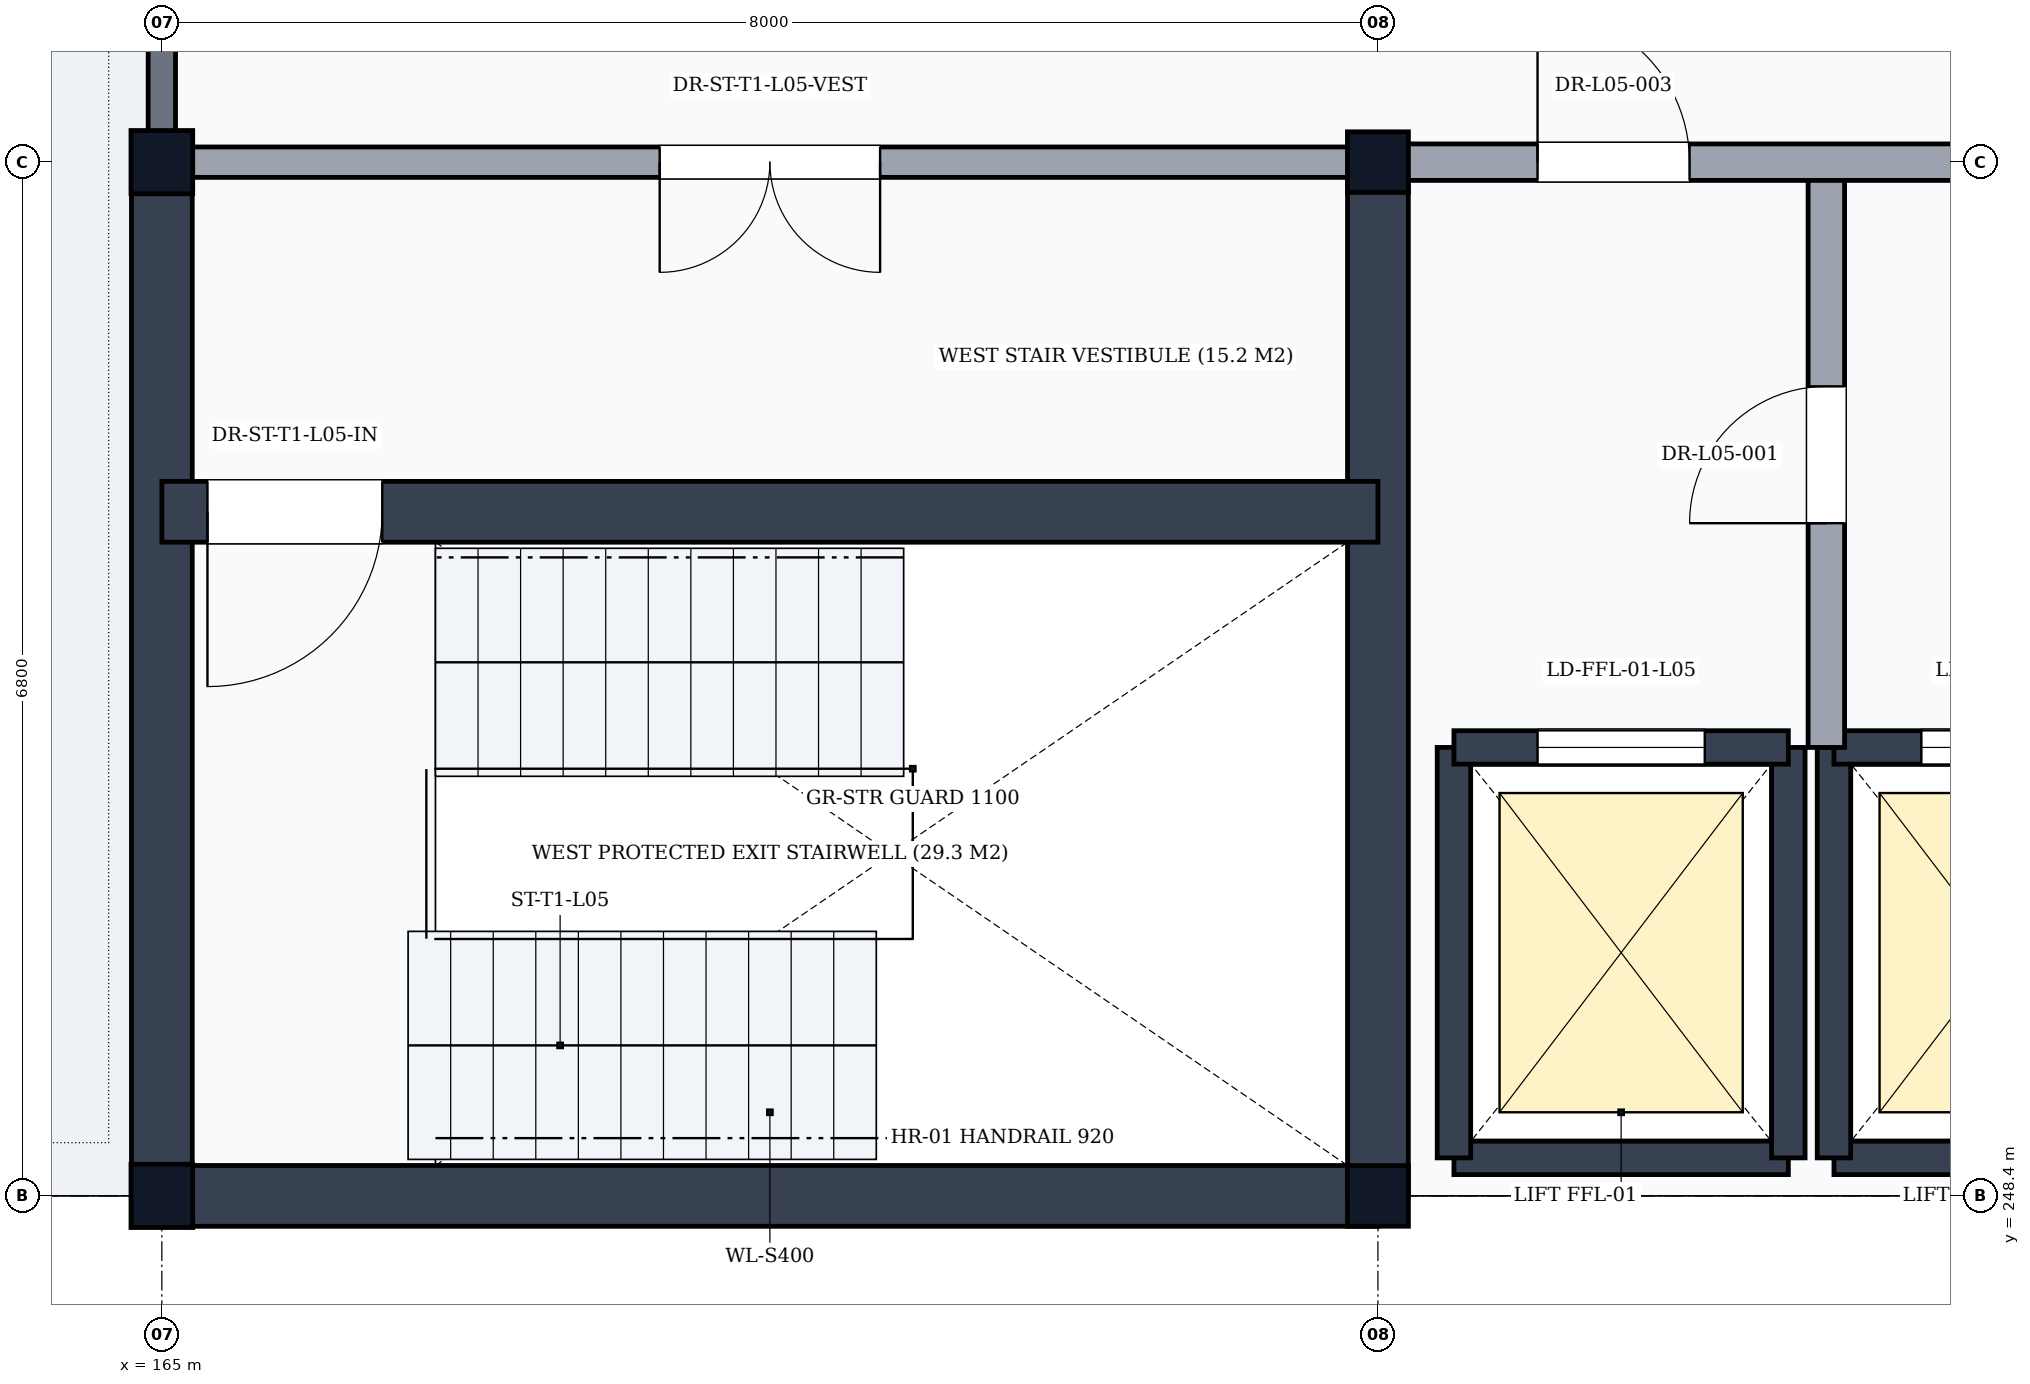
"""IFC4 building model, lengths in metres.
Left out: names, types, materials, properties, quantities, classifications, styles, units other than length and angle.
Written with IfcOpenShell. Run it as: python <this file> out.ifc"""

import sys

from ifc_helpers import new_model, si_unit, direction, frame, frame_2d, origin, origin_2d, place, context, subcontext, project, spatial, rectangle, i_section, extrude, element, fill, save


model = new_model("IFC4")
c1 = context("Model", 3, precision=1e-05, world=origin(), true_north=direction((0.0, 1.0)))
c2 = subcontext(c1, "Body", "Model", "MODEL_VIEW")
j1 = project(units=[si_unit("LENGTHUNIT", "METRE"), si_unit("PLANEANGLEUNIT", "RADIAN")], contexts=[c1])
p1 = place(None, origin())
s1 = spatial("IfcSite", under=j1, at=p1, CompositionType="ELEMENT")
p2 = place(p1, origin())
s2 = spatial("IfcBuilding", under=s1, at=p2, CompositionType="ELEMENT")
p3 = place(p2, frame((0.0, 0.0, 20.4)))
s3 = spatial("IfcBuildingStorey", under=s2, at=p3, CompositionType="ELEMENT", Elevation=20.4)
for number, where, z_axis, x_axis in (
    (1, (165.0, 248.4, 0.0), (0.0, 0.0, 1.0), (1.0, 0.0, 0.0)),
    (2, (165.0, 255.2, 0.0), (0.0, 0.0, 1.0), (1.0, 0.0, 0.0)),
):
    element("IfcColumn", number, at=place(p3, frame(where, z_axis=z_axis, x_axis=x_axis)), inside=s3, PredefinedType="COLUMN", context=c2, shape_type="SweptSolid", body=[
        extrude(i_section(OverallWidth=0.406, OverallDepth=0.416, WebThickness=0.03, FlangeThickness=0.048, FilletRadius=0.015, at=origin_2d()), origin(), (0.0, 0.0, 1.0), 3.9),
    ])
for number, where, z_axis, x_axis in (
    (3, (173.0, 248.4, 0.0), (0.0, 0.0, 1.0), (1.0, 0.0, 0.0)),
    (4, (173.0, 255.2, 0.0), (0.0, 0.0, 1.0), (1.0, 0.0, 0.0)),
):
    element("IfcColumn", number, at=place(p3, frame(where, z_axis=z_axis, x_axis=x_axis)), inside=s3, PredefinedType="COLUMN", context=c2, shape_type="SweptSolid", body=[
        extrude(i_section(OverallWidth=0.401, OverallDepth=0.399, WebThickness=0.025, FlangeThickness=0.04, FilletRadius=0.015, at=origin_2d()), origin(), (0.0, 0.0, 1.0), 3.9),
    ])
p4 = place(p3, frame((165.0, 255.206, 0.0), z_axis=(0.0, 0.0, 1.0), x_axis=(0.0, 1.0, 0.0)))
e5 = element("IfcWall", 5, at=p4, inside=s3, PredefinedType="SOLIDWALL", context=c2, shape_type="SweptSolid", body=[
    extrude(rectangle(XDim=7.588, YDim=0.18, at=frame_2d((3.794, 0.0))), origin(), (0.0, 0.0, 1.0), 3.388),
])
p5 = place(p3, frame((165.0, 248.4, 0.0), z_axis=(0.0, 0.0, 1.0), x_axis=(1.0, 0.0, 0.0)))
e6 = element("IfcWall", 6, at=p5, inside=s3, PredefinedType="SHEAR", context=c2, shape_type="SweptSolid", body=[
    extrude(rectangle(XDim=8.0, YDim=0.4, at=frame_2d((4.0, 0.0))), origin(), (0.0, 0.0, 1.0), 3.66),
])
for number, where, z_axis, x_axis in (
    (7, (165.0, 248.4, 0.0), (0.0, 0.0, 1.0), (0.0, 1.0, 0.0)),
    (8, (173.0, 248.4, 0.0), (0.0, 0.0, 1.0), (0.0, 1.0, 0.0)),
):
    element("IfcWall", number, at=place(p3, frame(where, z_axis=z_axis, x_axis=x_axis)), inside=s3, PredefinedType="SHEAR", context=c2, shape_type="SweptSolid", body=[
        extrude(rectangle(XDim=6.8, YDim=0.4, at=frame_2d((3.4, 0.0))), origin(), (0.0, 0.0, 1.0), 3.66),
    ])
p6 = place(p3, frame((165.0, 252.9, 0.0), z_axis=(0.0, 0.0, 1.0), x_axis=(1.0, 0.0, 0.0)))
e9 = element("IfcWall", 9, at=p6, inside=s3, PredefinedType="SHEAR", context=c2, shape_type="SweptSolid", body=[
    extrude(rectangle(XDim=8.0, YDim=0.4, at=frame_2d((4.0, 0.0))), origin(), (0.0, 0.0, 1.0), 3.66),
])
p7 = place(p6, frame((0.3, 0.0, 0.0)))
e10 = element("IfcOpeningElement", 10, at=p7, cuts=e9, PredefinedType="OPENING", context=c2, shape_type="SweptSolid", body=[
    extrude(rectangle(XDim=1.15, YDim=2.15, at=frame_2d((0.575, 1.075))), frame((0.0, 0.215, 0.0), z_axis=(0.0, -1.0, 0.0), x_axis=(1.0, 0.0, 0.0)), (0.0, 0.0, 1.0), 0.43),
])
p8 = place(p3, frame((165.0, 255.2, 0.0), z_axis=(0.0, 0.0, 1.0), x_axis=(1.0, 0.0, 0.0)))
e11 = element("IfcWall", 11, at=p8, inside=s3, PredefinedType="PARTITIONING", context=c2, shape_type="SweptSolid", body=[
    extrude(rectangle(XDim=8.0, YDim=0.2, at=frame_2d((4.0, 0.0))), origin(), (0.0, 0.0, 1.0), 3.058),
])
p9 = place(p8, frame((3.275, 0.0, 0.0)))
e12 = element("IfcOpeningElement", 12, at=p9, cuts=e11, PredefinedType="OPENING", context=c2, shape_type="SweptSolid", body=[
    extrude(rectangle(XDim=1.45, YDim=2.2, at=frame_2d((0.725, 1.1))), frame((0.0, 0.115, 0.0), z_axis=(0.0, -1.0, 0.0), x_axis=(1.0, 0.0, 0.0)), (0.0, 0.0, 1.0), 0.23),
])
p10 = place(p3, frame((173.5, 248.65, 0.0), z_axis=(0.0, 0.0, 1.0), x_axis=(1.0, 0.0, 0.0)))
e13 = element("IfcWall", 13, at=p10, inside=s3, PredefinedType="SHEAR", context=c2, shape_type="SweptSolid", body=[
    extrude(rectangle(XDim=2.2, YDim=0.22, at=frame_2d((1.1, 0.0))), origin(), (0.0, 0.0, 1.0), 3.66),
])
for number, where, z_axis, x_axis in (
    (14, (173.5, 248.65, 0.0), (0.0, 0.0, 1.0), (0.0, 1.0, 0.0)),
    (15, (175.7, 248.65, 0.0), (0.0, 0.0, 1.0), (0.0, 1.0, 0.0)),
):
    element("IfcWall", number, at=place(p3, frame(where, z_axis=z_axis, x_axis=x_axis)), inside=s3, PredefinedType="SHEAR", context=c2, shape_type="SweptSolid", body=[
        extrude(rectangle(XDim=2.7, YDim=0.22, at=frame_2d((1.35, 0.0))), origin(), (0.0, 0.0, 1.0), 3.66),
    ])
p11 = place(p3, frame((173.5, 251.35, 0.0), z_axis=(0.0, 0.0, 1.0), x_axis=(1.0, 0.0, 0.0)))
e16 = element("IfcWall", 16, at=p11, inside=s3, PredefinedType="SHEAR", context=c2, shape_type="SweptSolid", body=[
    extrude(rectangle(XDim=2.2, YDim=0.22, at=frame_2d((1.1, 0.0))), origin(), (0.0, 0.0, 1.0), 3.66),
])
p12 = place(p11, frame((0.55, 0.0, 0.0)))
e17 = element("IfcOpeningElement", 17, at=p12, cuts=e16, PredefinedType="OPENING", context=c2, shape_type="SweptSolid", body=[
    extrude(rectangle(XDim=1.1, YDim=2.15, at=frame_2d((0.55, 1.075))), frame((0.0, 0.125, 0.0), z_axis=(0.0, -1.0, 0.0), x_axis=(1.0, 0.0, 0.0)), (0.0, 0.0, 1.0), 0.25),
])
p13 = place(p3, frame((176.0, 248.65, 0.0), z_axis=(0.0, 0.0, 1.0), x_axis=(1.0, 0.0, 0.0)))
e18 = element("IfcWall", 18, at=p13, inside=s3, PredefinedType="SHEAR", context=c2, shape_type="SweptSolid", body=[
    extrude(rectangle(XDim=2.2, YDim=0.22, at=frame_2d((1.1, 0.0))), origin(), (0.0, 0.0, 1.0), 3.66),
])
p14 = place(p3, frame((176.0, 248.65, 0.0), z_axis=(0.0, 0.0, 1.0), x_axis=(0.0, 1.0, 0.0)))
e19 = element("IfcWall", 19, at=p14, inside=s3, PredefinedType="SHEAR", context=c2, shape_type="SweptSolid", body=[
    extrude(rectangle(XDim=2.7, YDim=0.22, at=frame_2d((1.35, 0.0))), origin(), (0.0, 0.0, 1.0), 3.66),
])
p15 = place(p3, frame((176.0, 251.35, 0.0), z_axis=(0.0, 0.0, 1.0), x_axis=(1.0, 0.0, 0.0)))
e20 = element("IfcWall", 20, at=p15, inside=s3, PredefinedType="SHEAR", context=c2, shape_type="SweptSolid", body=[
    extrude(rectangle(XDim=2.2, YDim=0.22, at=frame_2d((1.1, 0.0))), origin(), (0.0, 0.0, 1.0), 3.66),
])
p16 = place(p15, frame((0.575, 0.0, 0.0)))
e21 = element("IfcOpeningElement", 21, at=p16, cuts=e20, PredefinedType="OPENING", context=c2, shape_type="SweptSolid", body=[
    extrude(rectangle(XDim=1.05, YDim=2.15, at=frame_2d((0.525, 1.075))), frame((0.0, 0.125, 0.0), z_axis=(0.0, -1.0, 0.0), x_axis=(1.0, 0.0, 0.0)), (0.0, 0.0, 1.0), 0.25),
])
p17 = place(p3, frame((175.95, 251.35, 0.0), z_axis=(0.0, 0.0, 1.0), x_axis=(0.0, 1.0, 0.0)))
e22 = element("IfcWall", 22, at=p17, inside=s3, PredefinedType="PARTITIONING", context=c2, shape_type="SweptSolid", body=[
    extrude(rectangle(XDim=3.85, YDim=0.24, at=frame_2d((1.925, 0.0))), origin(), (0.0, 0.0, 1.0), 3.66),
])
p18 = place(p17, frame((1.475, 0.0, 0.0)))
e23 = element("IfcOpeningElement", 23, at=p18, cuts=e22, PredefinedType="OPENING", context=c2, shape_type="SweptSolid", body=[
    extrude(rectangle(XDim=0.9, YDim=2.1, at=frame_2d((0.45, 1.05))), frame((0.0, 0.135, 0.0), z_axis=(0.0, -1.0, 0.0), x_axis=(1.0, 0.0, 0.0)), (0.0, 0.0, 1.0), 0.27),
])
p19 = place(p3, frame((173.0, 255.2, 0.0), z_axis=(0.0, 0.0, 1.0), x_axis=(1.0, 0.0, 0.0)))
e24 = element("IfcWall", 24, at=p19, inside=s3, PredefinedType="PARTITIONING", context=c2, shape_type="SweptSolid", body=[
    extrude(rectangle(XDim=8.0, YDim=0.24, at=frame_2d((4.0, 0.0))), origin(), (0.0, 0.0, 1.0), 3.058),
])
p20 = place(p19, frame((1.05, 0.0, 0.0)))
e25 = element("IfcOpeningElement", 25, at=p20, cuts=e24, PredefinedType="OPENING", context=c2, shape_type="SweptSolid", body=[
    extrude(rectangle(XDim=1.0, YDim=2.1, at=frame_2d((0.5, 1.05))), frame((0.0, 0.135, 0.0), z_axis=(0.0, -1.0, 0.0), x_axis=(1.0, 0.0, 0.0)), (0.0, 0.0, 1.0), 0.27),
])
p21 = place(p19, frame((4.6, 0.0, 0.0)))
e26 = element("IfcOpeningElement", 26, at=p21, cuts=e24, PredefinedType="OPENING", context=c2, shape_type="SweptSolid", body=[
    extrude(rectangle(XDim=1.6, YDim=2.25, at=frame_2d((0.8, 1.125))), frame((0.0, 0.135, 0.0), z_axis=(0.0, -1.0, 0.0), x_axis=(1.0, 0.0, 0.0)), (0.0, 0.0, 1.0), 0.27),
])
p22 = place(p7, frame((1.15, 0.0, 0.0), z_axis=(0.0, 0.0, 1.0), x_axis=(-1.0, 0.0, 0.0)))
e27 = element("IfcDoor", 27, at=p22, inside=s3, OperationType="SINGLE_SWING_RIGHT", PredefinedType="DOOR", context=c2, shape_type="SweptSolid", body=[
    extrude(rectangle(XDim=1.15, YDim=2.15, at=frame_2d((0.575, 1.075))), frame((0.0, 0.025, 0.0), z_axis=(0.0, -1.0, 0.0), x_axis=(1.0, 0.0, 0.0)), (0.0, 0.0, 1.0), 0.05),
])
fill(e10, e27)
p23 = place(p9, frame((1.45, 0.0, 0.0), z_axis=(0.0, 0.0, 1.0), x_axis=(-1.0, 0.0, 0.0)))
e28 = element("IfcDoor", 28, at=p23, inside=s3, OperationType="DOUBLE_DOOR_SINGLE_SWING", PredefinedType="DOOR", context=c2, shape_type="SweptSolid", body=[
    extrude(rectangle(XDim=1.45, YDim=2.2, at=frame_2d((0.725, 1.1))), frame((0.0, 0.025, 0.0), z_axis=(0.0, -1.0, 0.0), x_axis=(1.0, 0.0, 0.0)), (0.0, 0.0, 1.0), 0.05),
])
fill(e12, e28)
p24 = place(p12, origin())
e29 = element("IfcDoor", 29, at=p24, inside=s3, OperationType="DOUBLE_DOOR_SLIDING", PredefinedType="USERDEFINED", context=c2, shape_type="SweptSolid", body=[
    extrude(rectangle(XDim=1.1, YDim=2.15, at=frame_2d((0.55, 1.075))), frame((0.0, 0.025, 0.0), z_axis=(0.0, -1.0, 0.0), x_axis=(1.0, 0.0, 0.0)), (0.0, 0.0, 1.0), 0.05),
])
fill(e17, e29)
p25 = place(p16, origin())
e30 = element("IfcDoor", 30, at=p25, inside=s3, OperationType="DOUBLE_DOOR_SLIDING", PredefinedType="USERDEFINED", context=c2, shape_type="SweptSolid", body=[
    extrude(rectangle(XDim=1.05, YDim=2.15, at=frame_2d((0.525, 1.075))), frame((0.0, 0.025, 0.0), z_axis=(0.0, -1.0, 0.0), x_axis=(1.0, 0.0, 0.0)), (0.0, 0.0, 1.0), 0.05),
])
fill(e21, e30)
p26 = place(p18, origin())
e31 = element("IfcDoor", 31, at=p26, inside=s3, OperationType="SINGLE_SWING_LEFT", PredefinedType="DOOR", context=c2, shape_type="SweptSolid", body=[
    extrude(rectangle(XDim=0.9, YDim=2.1, at=frame_2d((0.45, 1.05))), frame((0.0, 0.025, 0.0), z_axis=(0.0, -1.0, 0.0), x_axis=(1.0, 0.0, 0.0)), (0.0, 0.0, 1.0), 0.05),
])
fill(e23, e31)
p27 = place(p20, origin())
e32 = element("IfcDoor", 32, at=p27, inside=s3, OperationType="SINGLE_SWING_LEFT", PredefinedType="DOOR", context=c2, shape_type="SweptSolid", body=[
    extrude(rectangle(XDim=1.0, YDim=2.1, at=frame_2d((0.5, 1.05))), frame((0.0, 0.025, 0.0), z_axis=(0.0, -1.0, 0.0), x_axis=(1.0, 0.0, 0.0)), (0.0, 0.0, 1.0), 0.05),
])
fill(e25, e32)
save(model, sys.argv[1])
